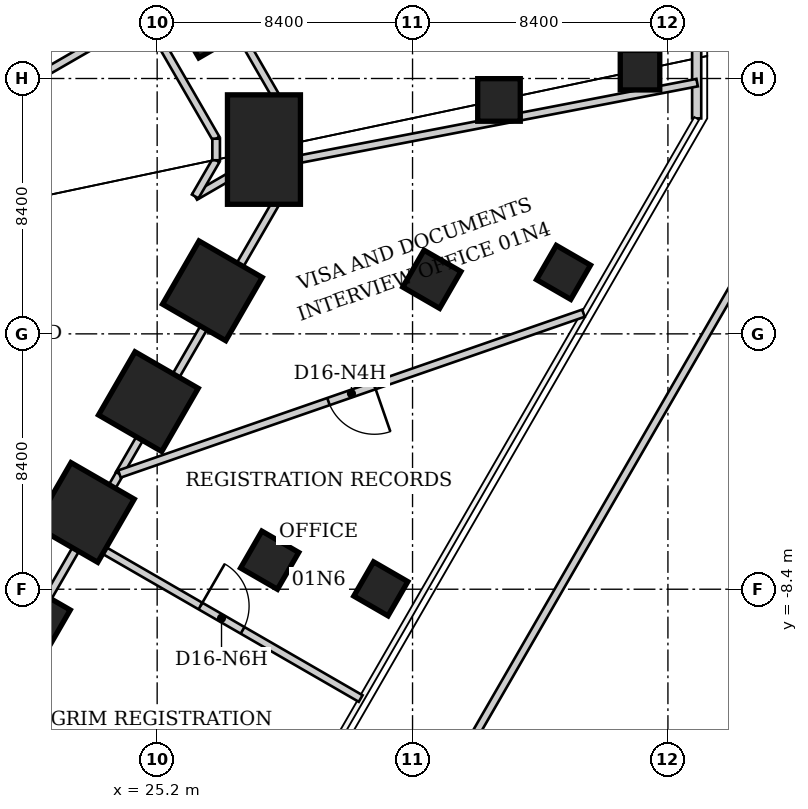
"""IFC4 building model, lengths in metres.
Left out: names, types, materials, properties, quantities, classifications, styles, units other than length and angle.
Written with IfcOpenShell. Run it as: python <this file> out.ifc"""

import sys

from ifc_helpers import new_model, si_unit, direction, frame, frame_2d, origin, origin_2d, place, context, subcontext, project, spatial, rectangle, extrude, element, fill, save


model = new_model("IFC4")
c1 = context("Model", 3, precision=1e-05, world=origin(), true_north=direction((0.0, 1.0)))
c2 = subcontext(c1, "Body", "Model", "MODEL_VIEW")
j1 = project(units=[si_unit("LENGTHUNIT", "METRE"), si_unit("PLANEANGLEUNIT", "RADIAN")], contexts=[c1])
p1 = place(None, origin())
s1 = spatial("IfcSite", under=j1, at=p1, CompositionType="ELEMENT")
p2 = place(p1, origin())
s2 = spatial("IfcBuilding", under=s1, at=p2, CompositionType="ELEMENT")
p3 = place(p2, frame((0.0, 0.0, 6.0)))
s3 = spatial("IfcBuildingStorey", under=s2, at=p3, CompositionType="ELEMENT", Elevation=6.0)
p4 = place(p3, frame((27.01, 10.719, 0.0), z_axis=(0.0, 0.0, 1.0), x_axis=(0.866025403784, 0.5, 0.0)))
e1 = element("IfcColumn", 1, at=p4, inside=s3, PredefinedType="COLUMN", context=c2, shape_type="SweptSolid", body=[
    extrude(rectangle(XDim=2.4, YDim=2.4, at=origin_2d()), origin(), (0.0, 0.0, 1.0), 6.0),
])
p5 = place(p3, frame((28.713, 6.062, 0.0), z_axis=(0.0, 0.0, 1.0), x_axis=(1.0, 0.0, 0.0)))
e2 = element("IfcColumn", 2, at=p5, inside=s3, PredefinedType="COLUMN", context=c2, shape_type="SweptSolid", body=[
    extrude(rectangle(XDim=2.4, YDim=3.6, at=origin_2d()), origin(), (0.0, 0.0, 1.0), 6.0),
])
for number, where, z_axis, x_axis in (
    (3, (27.016, 1.416, 0.0), (0.0, 0.0, 1.0), (0.866, -0.5, 0.0)),
    (4, (24.911, -2.23, 0.0), (0.0, 0.0, 1.0), (0.866, -0.5, 0.0)),
    (5, (22.806, -5.875, 0.0), (0.0, 0.0, 1.0), (0.866, -0.5, 0.0)),
    (6, (20.701, -9.521, 0.0), (0.0, 0.0, 1.0), (0.866, -0.5, 0.0)),
):
    element("IfcColumn", number, at=place(p3, frame(where, z_axis=z_axis, x_axis=x_axis)), inside=s3, PredefinedType="COLUMN", context=c2, shape_type="SweptSolid", body=[
        extrude(rectangle(XDim=2.4, YDim=2.4, at=origin_2d()), origin(), (0.0, 0.0, 1.0), 6.0),
    ])
for number, where, z_axis, x_axis in (
    (7, (36.443, 7.694, 0.0), (0.0, 0.0, 1.0), (1.0, 0.0, 0.0)),
    (8, (34.235, 1.795, 0.0), (0.0, 0.0, 1.0), (0.866, -0.5, 0.0)),
    (9, (28.9, -7.445, 0.0), (0.0, 0.0, 1.0), (0.866, -0.5, 0.0)),
):
    element("IfcColumn", number, at=place(p3, frame(where, z_axis=z_axis, x_axis=x_axis)), inside=s3, PredefinedType="COLUMN", context=c2, shape_type="SweptSolid", body=[
        extrude(rectangle(XDim=1.4, YDim=1.4, at=origin_2d()), origin(), (0.0, 0.0, 1.0), 6.0),
    ])
for number, where, z_axis, x_axis in (
    (10, (41.082, 8.674, 0.0), (0.0, 0.0, 1.0), (1.0, 0.0, 0.0)),
    (11, (38.566, 2.022, 0.0), (0.0, 0.0, 1.0), (0.866, -0.5, 0.0)),
    (12, (32.556, -8.387, 0.0), (0.0, 0.0, 1.0), (0.866, -0.5, 0.0)),
):
    element("IfcColumn", number, at=place(p3, frame(where, z_axis=z_axis, x_axis=x_axis)), inside=s3, PredefinedType="COLUMN", context=c2, shape_type="SweptSolid", body=[
        extrude(rectangle(XDim=1.3, YDim=1.3, at=origin_2d()), origin(), (0.0, 0.0, 1.0), 6.0),
    ])
p6 = place(p3, frame((42.945, 9.887, 0.0), z_axis=(0.0, 0.0, 1.0), x_axis=(0.0, -1.0, 0.0)))
e13 = element("IfcWall", 13, at=p6, inside=s3, PredefinedType="SOLIDWALL", context=c2, shape_type="SweptSolid", body=[
    extrude(rectangle(XDim=2.8, YDim=0.3, at=frame_2d((1.4, 0.0))), origin(), (0.0, 0.0, 1.0), 5.84),
])
p7 = place(p3, frame((17.117, -45.292, 0.0), z_axis=(0.0, 0.0, 1.0), x_axis=(0.499999154746, 0.866025891791, 0.0)))
e14 = element("IfcWall", 14, at=p7, inside=s3, PredefinedType="PARAPET", context=c2, shape_type="SweptSolid", body=[
    extrude(rectangle(XDim=61.33, YDim=0.25, at=frame_2d((30.665, 0.0))), origin(), (0.0, 0.0, 1.0), 1.1),
])
p8 = place(p3, frame((12.23, 3.24, 0.0), z_axis=(0.0, 0.0, 1.0), x_axis=(0.866071776036, 0.499919672301, 0.0)))
e15 = element("IfcWall", 15, at=p8, inside=s3, PredefinedType="PARTITIONING", context=c2, shape_type="SweptSolid", body=[
    extrude(rectangle(XDim=14.502, YDim=0.25, at=frame_2d((7.251, 0.0))), origin(), (0.0, 0.0, 1.0), 5.84),
])
p9 = place(p3, frame((17.25, -16.23, 0.0), z_axis=(0.0, 0.0, 1.0), x_axis=(0.499563458889, 0.866277294256, 0.0)))
e16 = element("IfcWall", 16, at=p9, inside=s3, PredefinedType="PARTITIONING", context=c2, shape_type="SweptSolid", body=[
    extrude(rectangle(XDim=10.99, YDim=0.25, at=frame_2d((5.495, 0.0))), origin(), (0.0, 0.0, 1.0), 4.04),
])
p10 = place(p3, frame((22.74, -6.71, 0.0), z_axis=(0.0, 0.0, 1.0), x_axis=(0.866032888183, -0.499987036418, 0.0)))
e17 = element("IfcWall", 17, at=p10, inside=s3, PredefinedType="PARTITIONING", context=c2, shape_type="SweptSolid", body=[
    extrude(rectangle(XDim=10.57, YDim=0.25, at=frame_2d((5.285, 0.0))), origin(), (0.0, 0.0, 1.0), 5.75),
])
p11 = place(p10, frame((4.485, 0.0, 0.0)))
e18 = element("IfcOpeningElement", 18, at=p11, cuts=e17, PredefinedType="OPENING", context=c2, shape_type="SweptSolid", body=[
    extrude(rectangle(XDim=1.6, YDim=2.4, at=frame_2d((0.8, 1.2))), frame((0.0, 0.125, 0.0), z_axis=(0.0, -1.0, 0.0), x_axis=(1.0, 0.0, 0.0)), (0.0, 0.0, 1.0), 0.25),
])
p12 = place(p3, frame((23.59, 12.57, 0.0), z_axis=(0.0, 0.0, 1.0), x_axis=(-0.866045825216, -0.499964627375, 0.0)))
e19 = element("IfcWall", 19, at=p12, inside=s3, PredefinedType="PARTITIONING", context=c2, shape_type="SweptSolid", body=[
    extrude(rectangle(XDim=12.101, YDim=0.25, at=frame_2d((6.051, 0.0))), origin(), (0.0, 0.0, 1.0), 5.84),
])
p13 = place(p3, frame((23.95, -4.61, 0.0), z_axis=(0.0, 0.0, 1.0), x_axis=(0.50047095257, 0.865753328399, 0.0)))
e20 = element("IfcWall", 20, at=p13, inside=s3, PredefinedType="PARTITIONING", context=c2, shape_type="SweptSolid", body=[
    extrude(rectangle(XDim=11.17, YDim=0.25, at=frame_2d((5.585, 0.0))), origin(), (0.0, 0.0, 1.0), 4.04),
])
p14 = place(p3, frame((23.96, -4.61, 0.0), z_axis=(0.0, 0.0, 1.0), x_axis=(-0.502351349133, -0.864663588932, 0.0)))
e21 = element("IfcWall", 21, at=p14, inside=s3, PredefinedType="PARTITIONING", context=c2, shape_type="SweptSolid", body=[
    extrude(rectangle(XDim=2.428, YDim=0.25, at=frame_2d((1.214, 0.0))), origin(), (0.0, 0.0, 1.0), 4.04),
])
p15 = place(p3, frame((24.79, 10.49, 0.0), z_axis=(0.0, 0.0, 1.0), x_axis=(0.499999753078, -0.866025546345, 0.0)))
e22 = element("IfcWall", 22, at=p15, inside=s3, PredefinedType="PARTITIONING", context=c2, shape_type="SweptSolid", body=[
    extrude(rectangle(XDim=4.7, YDim=0.25, at=frame_2d((2.35, 0.0))), origin(), (0.0, 0.0, 1.0), 5.84),
])
p16 = place(p3, frame((26.45, 4.52, 0.0), z_axis=(0.0, 0.0, 1.0), x_axis=(0.865299881392, 0.501254541389, 0.0)))
e23 = element("IfcWall", 23, at=p16, inside=s3, PredefinedType="PARTITIONING", context=c2, shape_type="SweptSolid", body=[
    extrude(rectangle(XDim=3.571, YDim=0.25, at=frame_2d((1.786, 0.0))), origin(), (0.0, 0.0, 1.0), 5.84),
])
p17 = place(p3, frame((27.14, 5.71, 0.0), z_axis=(0.0, 0.0, 1.0), x_axis=(-0.501595895466, -0.865102050426, 0.0)))
e24 = element("IfcWall", 24, at=p17, inside=s3, PredefinedType="PARTITIONING", context=c2, shape_type="SweptSolid", body=[
    extrude(rectangle(XDim=1.375, YDim=0.25, at=frame_2d((0.688, 0.0))), origin(), (0.0, 0.0, 1.0), 5.84),
])
p18 = place(p3, frame((27.14, 6.42, 0.0), z_axis=(0.0, 0.0, 1.0), x_axis=(0.0, -1.0, 0.0)))
e25 = element("IfcWall", 25, at=p18, inside=s3, PredefinedType="PARTITIONING", context=c2, shape_type="SweptSolid", body=[
    extrude(rectangle(XDim=0.71, YDim=0.25, at=frame_2d((0.355, 0.0))), origin(), (0.0, 0.0, 1.0), 5.84),
])
p19 = place(p3, frame((29.54, 5.645, 0.0), z_axis=(0.0, 0.0, 1.0), x_axis=(0.0, -1.0, 0.0)))
e26 = element("IfcWall", 26, at=p19, inside=s3, PredefinedType="PARTITIONING", context=c2, shape_type="SweptSolid", body=[
    extrude(rectangle(XDim=0.585, YDim=0.25, at=frame_2d((0.292, 0.0))), origin(), (0.0, 0.0, 1.0), 5.84),
])
p20 = place(p3, frame((29.54, 5.68, 0.0), z_axis=(0.0, 0.0, 1.0), x_axis=(0.0, 1.0, 0.0)))
e27 = element("IfcWall", 27, at=p20, inside=s3, PredefinedType="PARTITIONING", context=c2, shape_type="SweptSolid", body=[
    extrude(rectangle(XDim=0.63, YDim=0.25, at=frame_2d((0.315, 0.0))), origin(), (0.0, 0.0, 1.0), 5.84),
])
p21 = place(p3, frame((29.54, 6.31, 0.0), z_axis=(0.0, 0.0, 1.0), x_axis=(0.0, 1.0, 0.0)))
e28 = element("IfcWall", 28, at=p21, inside=s3, PredefinedType="PARTITIONING", context=c2, shape_type="SweptSolid", body=[
    extrude(rectangle(XDim=0.75, YDim=0.25, at=frame_2d((0.375, 0.0))), origin(), (0.0, 0.0, 1.0), 5.84),
])
p22 = place(p3, frame((29.54, 7.06, 0.0), z_axis=(0.0, 0.0, 1.0), x_axis=(-0.499558989476, 0.866279871655, 0.0)))
e29 = element("IfcWall", 29, at=p22, inside=s3, PredefinedType="PARTITIONING", context=c2, shape_type="SweptSolid", body=[
    extrude(rectangle(XDim=5.344, YDim=0.25, at=frame_2d((2.672, 0.0))), origin(), (0.0, 0.0, 1.0), 4.04),
])
p23 = place(p3, frame((39.222, 0.68, 0.0), z_axis=(0.0, 0.0, 1.0), x_axis=(-0.944844742576, -0.327518568065, 0.0)))
e30 = element("IfcWall", 30, at=p23, inside=s3, PredefinedType="PARTITIONING", context=c2, shape_type="SweptSolid", body=[
    extrude(rectangle(XDim=16.153, YDim=0.25, at=frame_2d((8.076, 0.0))), origin(), (0.0, 0.0, 1.0), 5.75),
])
p24 = place(p23, frame((7.276, 0.0, 0.0)))
e31 = element("IfcOpeningElement", 31, at=p24, cuts=e30, PredefinedType="OPENING", context=c2, shape_type="SweptSolid", body=[
    extrude(rectangle(XDim=1.6, YDim=2.4, at=frame_2d((0.8, 1.2))), frame((0.0, 0.125, 0.0), z_axis=(0.0, -1.0, 0.0), x_axis=(1.0, 0.0, 0.0)), (0.0, 0.0, 1.0), 0.25),
])
p25 = place(p3, frame((42.96, 8.264, 0.0), z_axis=(0.0, 0.0, 1.0), x_axis=(-0.981957231685, -0.189103133611, 0.0)))
e32 = element("IfcWall", 32, at=p25, inside=s3, PredefinedType="PARTITIONING", context=c2, shape_type="SweptSolid", body=[
    extrude(rectangle(XDim=13.667, YDim=0.25, at=frame_2d((6.833, 0.0))), origin(), (0.0, 0.0, 1.0), 5.75),
])
p26 = place(p24, origin())
e33 = element("IfcDoor", 33, at=p26, inside=s3, OperationType="DOUBLE_DOOR_SINGLE_SWING", PredefinedType="DOOR", context=c2, shape_type="SweptSolid", body=[
    extrude(rectangle(XDim=1.6, YDim=2.4, at=frame_2d((0.8, 1.2))), frame((0.0, 0.025, 0.0), z_axis=(0.0, -1.0, 0.0), x_axis=(1.0, 0.0, 0.0)), (0.0, 0.0, 1.0), 0.05),
])
fill(e31, e33)
p27 = place(p11, origin())
e34 = element("IfcDoor", 34, at=p27, inside=s3, OperationType="DOUBLE_DOOR_SINGLE_SWING", PredefinedType="DOOR", context=c2, shape_type="SweptSolid", body=[
    extrude(rectangle(XDim=1.6, YDim=2.4, at=frame_2d((0.8, 1.2))), frame((0.0, 0.025, 0.0), z_axis=(0.0, -1.0, 0.0), x_axis=(1.0, 0.0, 0.0)), (0.0, 0.0, 1.0), 0.05),
])
fill(e18, e34)
save(model, sys.argv[1])
